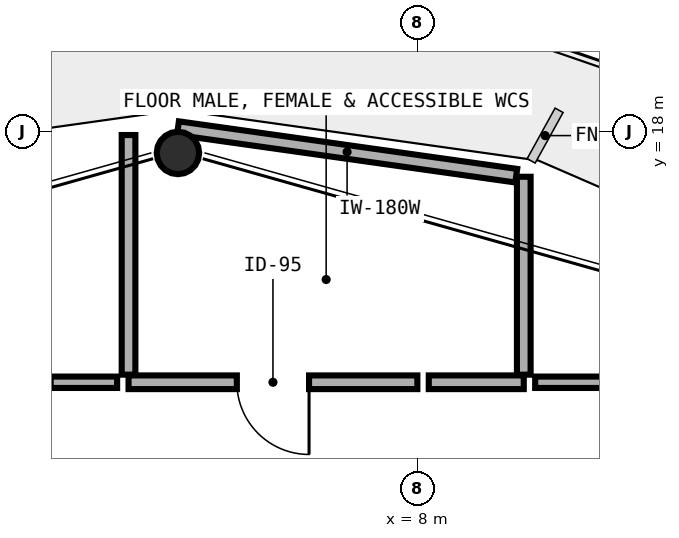
"""IFC4 building model, lengths in metres.
Left out: names, types, materials, properties, quantities, classifications, styles, units other than length and angle.
Written with IfcOpenShell. Run it as: python <this file> out.ifc"""

import sys

from ifc_helpers import new_model, si_unit, direction, frame, frame_2d, origin, origin_2d, place, context, subcontext, project, spatial, rectangle, hollow_circle, extrude, element, fill, save


model = new_model("IFC4")
c1 = context("Model", 3, precision=1e-05, world=origin(), true_north=direction((0.0, 1.0)))
c2 = subcontext(c1, "Body", "Model", "MODEL_VIEW")
j1 = project(units=[si_unit("LENGTHUNIT", "METRE"), si_unit("PLANEANGLEUNIT", "RADIAN")], contexts=[c1])
p1 = place(None, origin())
s1 = spatial("IfcSite", under=j1, at=p1, CompositionType="ELEMENT")
p2 = place(p1, origin())
s2 = spatial("IfcBuilding", under=s1, at=p2, CompositionType="ELEMENT")
p3 = place(p2, frame((0.0, 0.0, 285.0)))
s3 = spatial("IfcBuildingStorey", under=s2, at=p3, CompositionType="ELEMENT", Elevation=285.0)
p4 = place(p3, frame((4.85, 17.734, 0.0), z_axis=(0.0, -0.007582978919, 0.999971248802), x_axis=(1.0, 0.0, 0.0)))
e1 = element("IfcColumn", 1, at=p4, inside=s3, PredefinedType="COLUMN", context=c2, shape_type="SweptSolid", body=[
    extrude(hollow_circle(Radius=0.28, WallThickness=0.02, at=origin_2d()), origin(), (0.0, 0.0, 1.0), 4.475),
])
p5 = place(p3, frame((8.0, 14.7, 0.0), z_axis=(0.0, 0.0, 1.0), x_axis=(-1.0, 0.0, 0.0)))
e2 = element("IfcWall", 2, at=p5, inside=s3, PredefinedType="PLUMBINGWALL", context=c2, shape_type="SweptSolid", body=[
    extrude(rectangle(XDim=3.8, YDim=0.18, at=frame_2d((1.9, 0.0))), origin(), (0.0, 0.0, 1.0), 3.792),
])
p6 = place(p5, frame((1.425, 0.0, 0.0)))
e3 = element("IfcOpeningElement", 3, at=p6, cuts=e2, PredefinedType="OPENING", context=c2, shape_type="SweptSolid", body=[
    extrude(rectangle(XDim=0.95, YDim=2.1, at=frame_2d((0.475, 1.05))), frame((0.0, 0.1, 0.0), z_axis=(0.0, -1.0, 0.0), x_axis=(1.0, 0.0, 0.0)), (0.0, 0.0, 1.0), 0.2),
])
p7 = place(p3, frame((4.05, 14.7, 0.0), z_axis=(0.0, 0.0, 1.0), x_axis=(-1.0, 0.0, 0.0)))
e4 = element("IfcWall", 4, at=p7, inside=s3, PredefinedType="PARTITIONING", context=c2, shape_type="SweptSolid", body=[
    extrude(rectangle(XDim=2.85, YDim=0.15, at=frame_2d((1.425, 0.0))), origin(), (0.0, 0.0, 1.0), 3.792),
])
p8 = place(p7, frame((0.875, 0.0, 0.0)))
e5 = element("IfcOpeningElement", 5, at=p8, cuts=e4, PredefinedType="OPENING", context=c2, shape_type="SweptSolid", body=[
    extrude(rectangle(XDim=0.95, YDim=2.1, at=frame_2d((0.475, 1.05))), frame((0.0, 0.085, 0.0), z_axis=(0.0, -1.0, 0.0), x_axis=(1.0, 0.0, 0.0)), (0.0, 0.0, 1.0), 0.17),
])
p9 = place(p3, frame((9.4, 14.7, 0.0), z_axis=(0.0, 0.0, 1.0), x_axis=(-1.0, 0.0, 0.0)))
e6 = element("IfcWall", 6, at=p9, inside=s3, PredefinedType="PLUMBINGWALL", context=c2, shape_type="SweptSolid", body=[
    extrude(rectangle(XDim=1.25, YDim=0.18, at=frame_2d((0.625, 0.0))), origin(), (0.0, 0.0, 1.0), 3.792),
])
p10 = place(p3, frame((4.2, 17.953, 0.0), z_axis=(0.0, 0.0, 1.0), x_axis=(0.0, -1.0, 0.0)))
e7 = element("IfcWall", 7, at=p10, inside=s3, PredefinedType="PLUMBINGWALL", context=c2, shape_type="SweptSolid", body=[
    extrude(rectangle(XDim=3.153, YDim=0.18, at=frame_2d((1.576, 0.0))), origin(), (0.0, 0.0, 1.0), 4.08),
])
p11 = place(p3, frame((10.715, 14.7, 0.0), z_axis=(0.0, 0.0, 1.0), x_axis=(-1.0, 0.0, 0.0)))
e8 = element("IfcWall", 8, at=p11, inside=s3, PredefinedType="PARTITIONING", context=c2, shape_type="SweptSolid", body=[
    extrude(rectangle(XDim=1.165, YDim=0.15, at=frame_2d((0.583, 0.0))), origin(), (0.0, 0.0, 1.0), 3.792),
])
p12 = place(p3, frame((9.4, 14.8, 0.0), z_axis=(0.0, 0.0, 1.0), x_axis=(0.0, 1.0, 0.0)))
e9 = element("IfcWall", 9, at=p12, inside=s3, PredefinedType="PLUMBINGWALL", context=c2, shape_type="SweptSolid", body=[
    extrude(rectangle(XDim=2.604, YDim=0.18, at=frame_2d((1.302, 0.0))), origin(), (0.0, 0.0, 1.0), 4.08),
])
p13 = place(p3, frame((9.301, 17.418, 0.0), z_axis=(0.0, 0.0, 1.0), x_axis=(-0.990254589148, 0.139268979572, 0.0)))
e10 = element("IfcWall", 10, at=p13, inside=s3, PredefinedType="PLUMBINGWALL", context=c2, shape_type="SweptSolid", body=[
    extrude(rectangle(XDim=4.495, YDim=0.18, at=frame_2d((2.247, 0.0))), origin(), (0.0, 0.0, 1.0), 3.702),
])
p14 = place(p6, origin())
e11 = element("IfcDoor", 11, at=p14, inside=s3, OperationType="SINGLE_SWING_LEFT", PredefinedType="DOOR", context=c2, shape_type="SweptSolid", body=[
    extrude(rectangle(XDim=0.95, YDim=2.1, at=frame_2d((0.475, 1.05))), frame((0.0, 0.025, 0.0), z_axis=(0.0, -1.0, 0.0), x_axis=(1.0, 0.0, 0.0)), (0.0, 0.0, 1.0), 0.05),
])
fill(e3, e11)
save(model, sys.argv[1])
